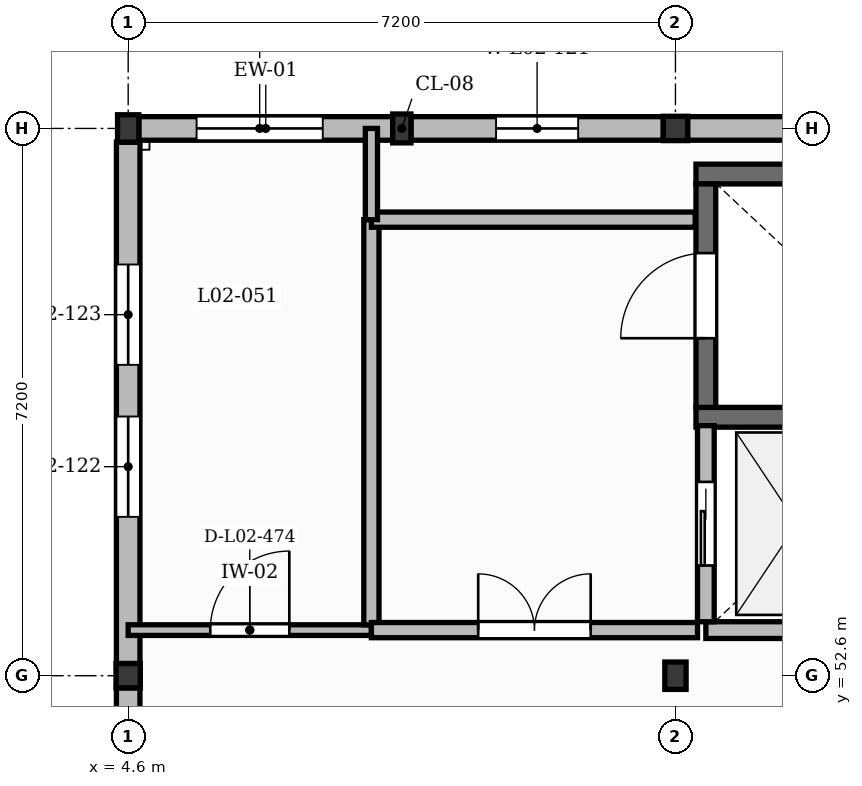
"""IFC4 building model, lengths in metres.
Left out: names, types, materials, properties, quantities, classifications, styles, units other than length and angle.
Written with IfcOpenShell. Run it as: python <this file> out.ifc"""

import sys

from ifc_helpers import new_model, si_unit, direction, frame, frame_2d, origin, origin_2d, place, context, subcontext, project, spatial, rectangle, extrude, element, fill, save


model = new_model("IFC4")
c1 = context("Model", 3, precision=1e-05, world=origin(), true_north=direction((0.0, 1.0)))
c2 = subcontext(c1, "Body", "Model", "MODEL_VIEW")
j1 = project(units=[si_unit("LENGTHUNIT", "METRE"), si_unit("PLANEANGLEUNIT", "RADIAN")], contexts=[c1])
p1 = place(None, origin())
s1 = spatial("IfcSite", under=j1, at=p1, CompositionType="ELEMENT")
p2 = place(p1, origin())
s2 = spatial("IfcBuilding", under=s1, at=p2, CompositionType="ELEMENT")
p3 = place(p2, frame((0.0, 0.0, 9.0)))
s3 = spatial("IfcBuildingStorey", under=s2, at=p3, CompositionType="ELEMENT", Elevation=9.0)
p4 = place(p3, frame((4.6, 52.6, 0.0), z_axis=(0.0, 0.0, 1.0), x_axis=(1.0, 0.0, 0.0)))
e1 = element("IfcColumn", 1, at=p4, inside=s3, PredefinedType="COLUMN", context=c2, shape_type="SweptSolid", body=[
    extrude(rectangle(XDim=0.32, YDim=0.32, at=origin_2d()), origin(), (0.0, 0.0, 1.0), 3.99),
])
for number, where, z_axis, x_axis in (
    (2, (4.6, 59.8, 0.0), (0.0, 0.0, 1.0), (1.0, 0.0, 0.0)),
    (3, (11.8, 52.6, 0.0), (0.0, 0.0, 1.0), (1.0, 0.0, 0.0)),
):
    element("IfcColumn", number, at=place(p3, frame(where, z_axis=z_axis, x_axis=x_axis)), inside=s3, PredefinedType="COLUMN", context=c2, shape_type="SweptSolid", body=[
        extrude(rectangle(XDim=0.28, YDim=0.36, at=origin_2d()), origin(), (0.0, 0.0, 1.0), 3.99),
    ])
p5 = place(p3, frame((11.8, 59.8, 0.0), z_axis=(0.0, 0.0, 1.0), x_axis=(1.0, 0.0, 0.0)))
e4 = element("IfcColumn", 4, at=p5, inside=s3, PredefinedType="COLUMN", context=c2, shape_type="SweptSolid", body=[
    extrude(rectangle(XDim=0.32, YDim=0.32, at=origin_2d()), origin(), (0.0, 0.0, 1.0), 3.99),
])
p6 = place(p3, frame((8.2, 59.8, 0.0), z_axis=(0.0, 0.0, 1.0), x_axis=(1.0, 0.0, 0.0)))
e5 = element("IfcColumn", 5, at=p6, inside=s3, PredefinedType="PILASTER", context=c2, shape_type="SweptSolid", body=[
    extrude(rectangle(XDim=0.24, YDim=0.38, at=origin_2d()), origin(), (0.0, 0.0, 1.0), 3.99),
])
p7 = place(p3, frame((4.6, 45.58, 0.0), z_axis=(0.0, 0.0, 1.0), x_axis=(0.0, 1.0, 0.0)))
e6 = element("IfcWall", 6, at=p7, inside=s3, PredefinedType="SOLIDWALL", context=c2, shape_type="SweptSolid", body=[
    extrude(rectangle(XDim=6.86, YDim=0.31, at=frame_2d((3.43, 0.0))), origin(), (0.0, 0.0, 1.0), 3.53),
])
p8 = place(p7, frame((1.59, 0.0, 1.05)))
e7 = element("IfcOpeningElement", 7, at=p8, cuts=e6, PredefinedType="OPENING", context=c2, shape_type="SweptSolid", body=[
    extrude(rectangle(XDim=1.96, YDim=1.65, at=frame_2d((0.98, 0.825))), frame((0.0, 0.165, 0.0), z_axis=(0.0, -1.0, 0.0), x_axis=(1.0, 0.0, 0.0)), (0.0, 0.0, 1.0), 0.33),
])
p9 = place(p3, frame((4.74, 59.8, 0.0), z_axis=(0.0, 0.0, 1.0), x_axis=(1.0, 0.0, 0.0)))
e8 = element("IfcWall", 8, at=p9, inside=s3, PredefinedType="SOLIDWALL", context=c2, shape_type="SweptSolid", body=[
    extrude(rectangle(XDim=3.34, YDim=0.31, at=frame_2d((1.67, 0.0))), origin(), (0.0, 0.0, 1.0), 3.53),
])
p10 = place(p9, frame((0.76, 0.0, 1.0)))
e9 = element("IfcOpeningElement", 9, at=p10, cuts=e8, PredefinedType="OPENING", context=c2, shape_type="SweptSolid", body=[
    extrude(rectangle(XDim=1.66, YDim=1.8, at=frame_2d((0.83, 0.9))), frame((0.0, 0.165, 0.0), z_axis=(0.0, -1.0, 0.0), x_axis=(1.0, 0.0, 0.0)), (0.0, 0.0, 1.0), 0.33),
])
p11 = place(p3, frame((8.32, 59.8, 0.0), z_axis=(0.0, 0.0, 1.0), x_axis=(1.0, 0.0, 0.0)))
e10 = element("IfcWall", 10, at=p11, inside=s3, PredefinedType="SOLIDWALL", context=c2, shape_type="SweptSolid", body=[
    extrude(rectangle(XDim=3.32, YDim=0.31, at=frame_2d((1.66, 0.0))), origin(), (0.0, 0.0, 1.0), 3.53),
])
p12 = place(p11, frame((1.12, 0.0, 1.0)))
e11 = element("IfcOpeningElement", 11, at=p12, cuts=e10, PredefinedType="OPENING", context=c2, shape_type="SweptSolid", body=[
    extrude(rectangle(XDim=1.08, YDim=1.95, at=frame_2d((0.54, 0.975))), frame((0.0, 0.165, 0.0), z_axis=(0.0, -1.0, 0.0), x_axis=(1.0, 0.0, 0.0)), (0.0, 0.0, 1.0), 0.33),
])
p13 = place(p3, frame((4.6, 52.76, 0.0), z_axis=(0.0, 0.0, 1.0), x_axis=(0.0, 1.0, 0.0)))
e12 = element("IfcWall", 12, at=p13, inside=s3, PredefinedType="SOLIDWALL", context=c2, shape_type="SweptSolid", body=[
    extrude(rectangle(XDim=6.86, YDim=0.31, at=frame_2d((3.43, 0.0))), origin(), (0.0, 0.0, 1.0), 3.53),
])
p14 = place(p13, frame((1.93, 0.0, 1.5)))
e13 = element("IfcOpeningElement", 13, at=p14, cuts=e12, PredefinedType="OPENING", context=c2, shape_type="SweptSolid", body=[
    extrude(rectangle(XDim=1.32, YDim=1.25, at=frame_2d((0.66, 0.625))), frame((0.0, 0.165, 0.0), z_axis=(0.0, -1.0, 0.0), x_axis=(1.0, 0.0, 0.0)), (0.0, 0.0, 1.0), 0.33),
])
p15 = place(p13, frame((3.93, 0.0, 1.5)))
e14 = element("IfcOpeningElement", 14, at=p15, cuts=e12, PredefinedType="OPENING", context=c2, shape_type="SweptSolid", body=[
    extrude(rectangle(XDim=1.32, YDim=1.25, at=frame_2d((0.66, 0.625))), frame((0.0, 0.165, 0.0), z_axis=(0.0, -1.0, 0.0), x_axis=(1.0, 0.0, 0.0)), (0.0, 0.0, 1.0), 0.33),
])
p16 = place(p3, frame((11.96, 59.8, 0.0), z_axis=(0.0, 0.0, 1.0), x_axis=(1.0, 0.0, 0.0)))
e15 = element("IfcWall", 15, at=p16, inside=s3, PredefinedType="SOLIDWALL", context=c2, shape_type="SweptSolid", body=[
    extrude(rectangle(XDim=6.9, YDim=0.31, at=frame_2d((3.45, 0.0))), origin(), (0.0, 0.0, 1.0), 3.53),
])
for number, where, z_axis, x_axis in (
    (16, (12.07, 56.0, 0.0), (0.0, 0.0, 1.0), (1.0, 0.0, 0.0)),
    (17, (12.07, 59.2, 0.0), (0.0, 0.0, 1.0), (1.0, 0.0, 0.0)),
):
    element("IfcWall", number, at=place(p3, frame(where, z_axis=z_axis, x_axis=x_axis)), inside=s3, PredefinedType="SHEAR", context=c2, shape_type="SweptSolid", body=[
        extrude(rectangle(XDim=6.66, YDim=0.26, at=frame_2d((3.33, 0.0))), origin(), (0.0, 0.0, 1.0), 3.95),
    ])
p17 = place(p3, frame((12.2, 56.13, 0.0), z_axis=(0.0, 0.0, 1.0), x_axis=(0.0, 1.0, 0.0)))
e18 = element("IfcWall", 18, at=p17, inside=s3, PredefinedType="SHEAR", context=c2, shape_type="SweptSolid", body=[
    extrude(rectangle(XDim=2.94, YDim=0.26, at=frame_2d((1.47, 0.0))), origin(), (0.0, 0.0, 1.0), 3.95),
])
p18 = place(p17, frame((0.91, 0.0, 0.0)))
e19 = element("IfcOpeningElement", 19, at=p18, cuts=e18, PredefinedType="OPENING", context=c2, shape_type="SweptSolid", body=[
    extrude(rectangle(XDim=1.12, YDim=2.1, at=frame_2d((0.56, 1.05))), frame((0.0, 0.14, 0.0), z_axis=(0.0, -1.0, 0.0), x_axis=(1.0, 0.0, 0.0)), (0.0, 0.0, 1.0), 0.28),
])
p19 = place(p3, frame((12.2, 53.2, 0.0), z_axis=(0.0, 0.0, 1.0), x_axis=(1.0, 0.0, 0.0)))
e20 = element("IfcWall", 20, at=p19, inside=s3, PredefinedType="SOLIDWALL", context=c2, shape_type="SweptSolid", body=[
    extrude(rectangle(XDim=2.4, YDim=0.22, at=frame_2d((1.2, 0.0))), origin(), (0.0, 0.0, 1.0), 3.95),
])
p20 = place(p3, frame((12.2, 53.31, 0.0), z_axis=(0.0, 0.0, 1.0), x_axis=(0.0, 1.0, 0.0)))
e21 = element("IfcWall", 21, at=p20, inside=s3, PredefinedType="SOLIDWALL", context=c2, shape_type="SweptSolid", body=[
    extrude(rectangle(XDim=2.58, YDim=0.22, at=frame_2d((1.29, 0.0))), origin(), (0.0, 0.0, 1.0), 3.95),
])
p21 = place(p20, frame((0.74, 0.0, 0.0)))
e22 = element("IfcOpeningElement", 22, at=p21, cuts=e21, PredefinedType="OPENING", context=c2, shape_type="SweptSolid", body=[
    extrude(rectangle(XDim=1.1, YDim=2.15, at=frame_2d((0.55, 1.075))), frame((0.0, 0.12, 0.0), z_axis=(0.0, -1.0, 0.0), x_axis=(1.0, 0.0, 0.0)), (0.0, 0.0, 1.0), 0.24),
])
p22 = place(p3, frame((4.6, 53.2, 0.0), z_axis=(0.0, 0.0, 1.0), x_axis=(1.0, 0.0, 0.0)))
e23 = element("IfcWall", 23, at=p22, inside=s3, PredefinedType="PARTITIONING", context=c2, shape_type="SweptSolid", body=[
    extrude(rectangle(XDim=3.2, YDim=0.14, at=frame_2d((1.6, 0.0))), origin(), (0.0, 0.0, 1.0), 3.96),
])
p23 = place(p22, frame((1.08, 0.0, 0.0)))
e24 = element("IfcOpeningElement", 24, at=p23, cuts=e23, PredefinedType="OPENING", context=c2, shape_type="SweptSolid", body=[
    extrude(rectangle(XDim=1.04, YDim=2.1, at=frame_2d((0.52, 1.05))), frame((0.0, 0.08, 0.0), z_axis=(0.0, -1.0, 0.0), x_axis=(1.0, 0.0, 0.0)), (0.0, 0.0, 1.0), 0.16),
])
p24 = place(p3, frame((7.8, 53.27, 0.0), z_axis=(0.0, 0.0, 1.0), x_axis=(0.0, 1.0, 0.0)))
e25 = element("IfcWall", 25, at=p24, inside=s3, PredefinedType="PARTITIONING", context=c2, shape_type="SweptSolid", body=[
    extrude(rectangle(XDim=5.33, YDim=0.2, at=frame_2d((2.665, 0.0))), origin(), (0.0, 0.0, 1.0), 3.96),
])
p25 = place(p3, frame((7.8, 53.2, 0.0), z_axis=(0.0, 0.0, 1.0), x_axis=(1.0, 0.0, 0.0)))
e26 = element("IfcWall", 26, at=p25, inside=s3, PredefinedType="PARTITIONING", context=c2, shape_type="SweptSolid", body=[
    extrude(rectangle(XDim=4.29, YDim=0.2, at=frame_2d((2.145, 0.0))), origin(), (0.0, 0.0, 1.0), 3.96),
])
p26 = place(p25, frame((1.405, 0.0, 0.0)))
e27 = element("IfcOpeningElement", 27, at=p26, cuts=e26, PredefinedType="OPENING", context=c2, shape_type="SweptSolid", body=[
    extrude(rectangle(XDim=1.48, YDim=2.25, at=frame_2d((0.74, 1.125))), frame((0.0, 0.11, 0.0), z_axis=(0.0, -1.0, 0.0), x_axis=(1.0, 0.0, 0.0)), (0.0, 0.0, 1.0), 0.22),
])
p27 = place(p3, frame((12.06, 58.6, 0.0), z_axis=(0.0, 0.0, 1.0), x_axis=(-1.0, 0.0, 0.0)))
e28 = element("IfcWall", 28, at=p27, inside=s3, PredefinedType="PARTITIONING", context=c2, shape_type="SweptSolid", body=[
    extrude(rectangle(XDim=4.26, YDim=0.2, at=frame_2d((2.13, 0.0))), origin(), (0.0, 0.0, 1.0), 3.96),
])
p28 = place(p3, frame((7.8, 58.6, 0.0), z_axis=(0.0, 0.0, 1.0), x_axis=(0.0, 1.0, 0.0)))
e29 = element("IfcWall", 29, at=p28, inside=s3, PredefinedType="PARTITIONING", context=c2, shape_type="SweptSolid", body=[
    extrude(rectangle(XDim=1.2, YDim=0.16, at=frame_2d((0.6, 0.0))), origin(), (0.0, 0.0, 1.0), 3.96),
])
p29 = place(p10, origin())
e30 = element("IfcWindow", 30, at=p29, inside=s3, PartitioningType="DOUBLE_PANEL_VERTICAL", PredefinedType="WINDOW", context=c2, shape_type="SweptSolid", body=[
    extrude(rectangle(XDim=1.66, YDim=1.8, at=frame_2d((0.83, 0.9))), frame((0.0, 0.03, 0.0), z_axis=(0.0, -1.0, 0.0), x_axis=(1.0, 0.0, 0.0)), (0.0, 0.0, 1.0), 0.06),
])
fill(e9, e30)
p30 = place(p12, origin())
e31 = element("IfcWindow", 31, at=p30, inside=s3, PartitioningType="SINGLE_PANEL", PredefinedType="WINDOW", context=c2, shape_type="SweptSolid", body=[
    extrude(rectangle(XDim=1.08, YDim=1.95, at=frame_2d((0.54, 0.975))), frame((0.0, 0.03, 0.0), z_axis=(0.0, -1.0, 0.0), x_axis=(1.0, 0.0, 0.0)), (0.0, 0.0, 1.0), 0.06),
])
fill(e11, e31)
p31 = place(p14, origin())
e32 = element("IfcWindow", 32, at=p31, inside=s3, PartitioningType="SINGLE_PANEL", PredefinedType="WINDOW", context=c2, shape_type="SweptSolid", body=[
    extrude(rectangle(XDim=1.32, YDim=1.25, at=frame_2d((0.66, 0.625))), frame((0.0, 0.03, 0.0), z_axis=(0.0, -1.0, 0.0), x_axis=(1.0, 0.0, 0.0)), (0.0, 0.0, 1.0), 0.06),
])
fill(e13, e32)
p32 = place(p15, origin())
e33 = element("IfcWindow", 33, at=p32, inside=s3, PartitioningType="SINGLE_PANEL", PredefinedType="WINDOW", context=c2, shape_type="SweptSolid", body=[
    extrude(rectangle(XDim=1.32, YDim=1.25, at=frame_2d((0.66, 0.625))), frame((0.0, 0.03, 0.0), z_axis=(0.0, -1.0, 0.0), x_axis=(1.0, 0.0, 0.0)), (0.0, 0.0, 1.0), 0.06),
])
fill(e14, e33)
p33 = place(p21, origin())
e34 = element("IfcDoor", 34, at=p33, inside=s3, OperationType="SLIDING_TO_LEFT", PredefinedType="DOOR", context=c2, shape_type="SweptSolid", body=[
    extrude(rectangle(XDim=1.1, YDim=2.15, at=frame_2d((0.55, 1.075))), frame((0.0, 0.025, 0.0), z_axis=(0.0, -1.0, 0.0), x_axis=(1.0, 0.0, 0.0)), (0.0, 0.0, 1.0), 0.05),
])
fill(e22, e34)
p34 = place(p18, origin())
e35 = element("IfcDoor", 35, at=p34, inside=s3, OperationType="SINGLE_SWING_LEFT", PredefinedType="DOOR", context=c2, shape_type="SweptSolid", body=[
    extrude(rectangle(XDim=1.12, YDim=2.1, at=frame_2d((0.56, 1.05))), frame((0.0, 0.025, 0.0), z_axis=(0.0, -1.0, 0.0), x_axis=(1.0, 0.0, 0.0)), (0.0, 0.0, 1.0), 0.05),
])
fill(e19, e35)
p35 = place(p26, origin())
e36 = element("IfcDoor", 36, at=p35, inside=s3, OperationType="DOUBLE_DOOR_SINGLE_SWING", PredefinedType="DOOR", context=c2, shape_type="SweptSolid", body=[
    extrude(rectangle(XDim=1.48, YDim=2.25, at=frame_2d((0.74, 1.125))), frame((0.0, 0.025, 0.0), z_axis=(0.0, -1.0, 0.0), x_axis=(1.0, 0.0, 0.0)), (0.0, 0.0, 1.0), 0.05),
])
fill(e27, e36)
p36 = place(p23, origin())
e37 = element("IfcDoor", 37, at=p36, inside=s3, OperationType="SINGLE_SWING_RIGHT", PredefinedType="DOOR", context=c2, shape_type="SweptSolid", body=[
    extrude(rectangle(XDim=1.04, YDim=2.1, at=frame_2d((0.52, 1.05))), frame((0.0, 0.025, 0.0), z_axis=(0.0, -1.0, 0.0), x_axis=(1.0, 0.0, 0.0)), (0.0, 0.0, 1.0), 0.05),
])
fill(e24, e37)
save(model, sys.argv[1])
